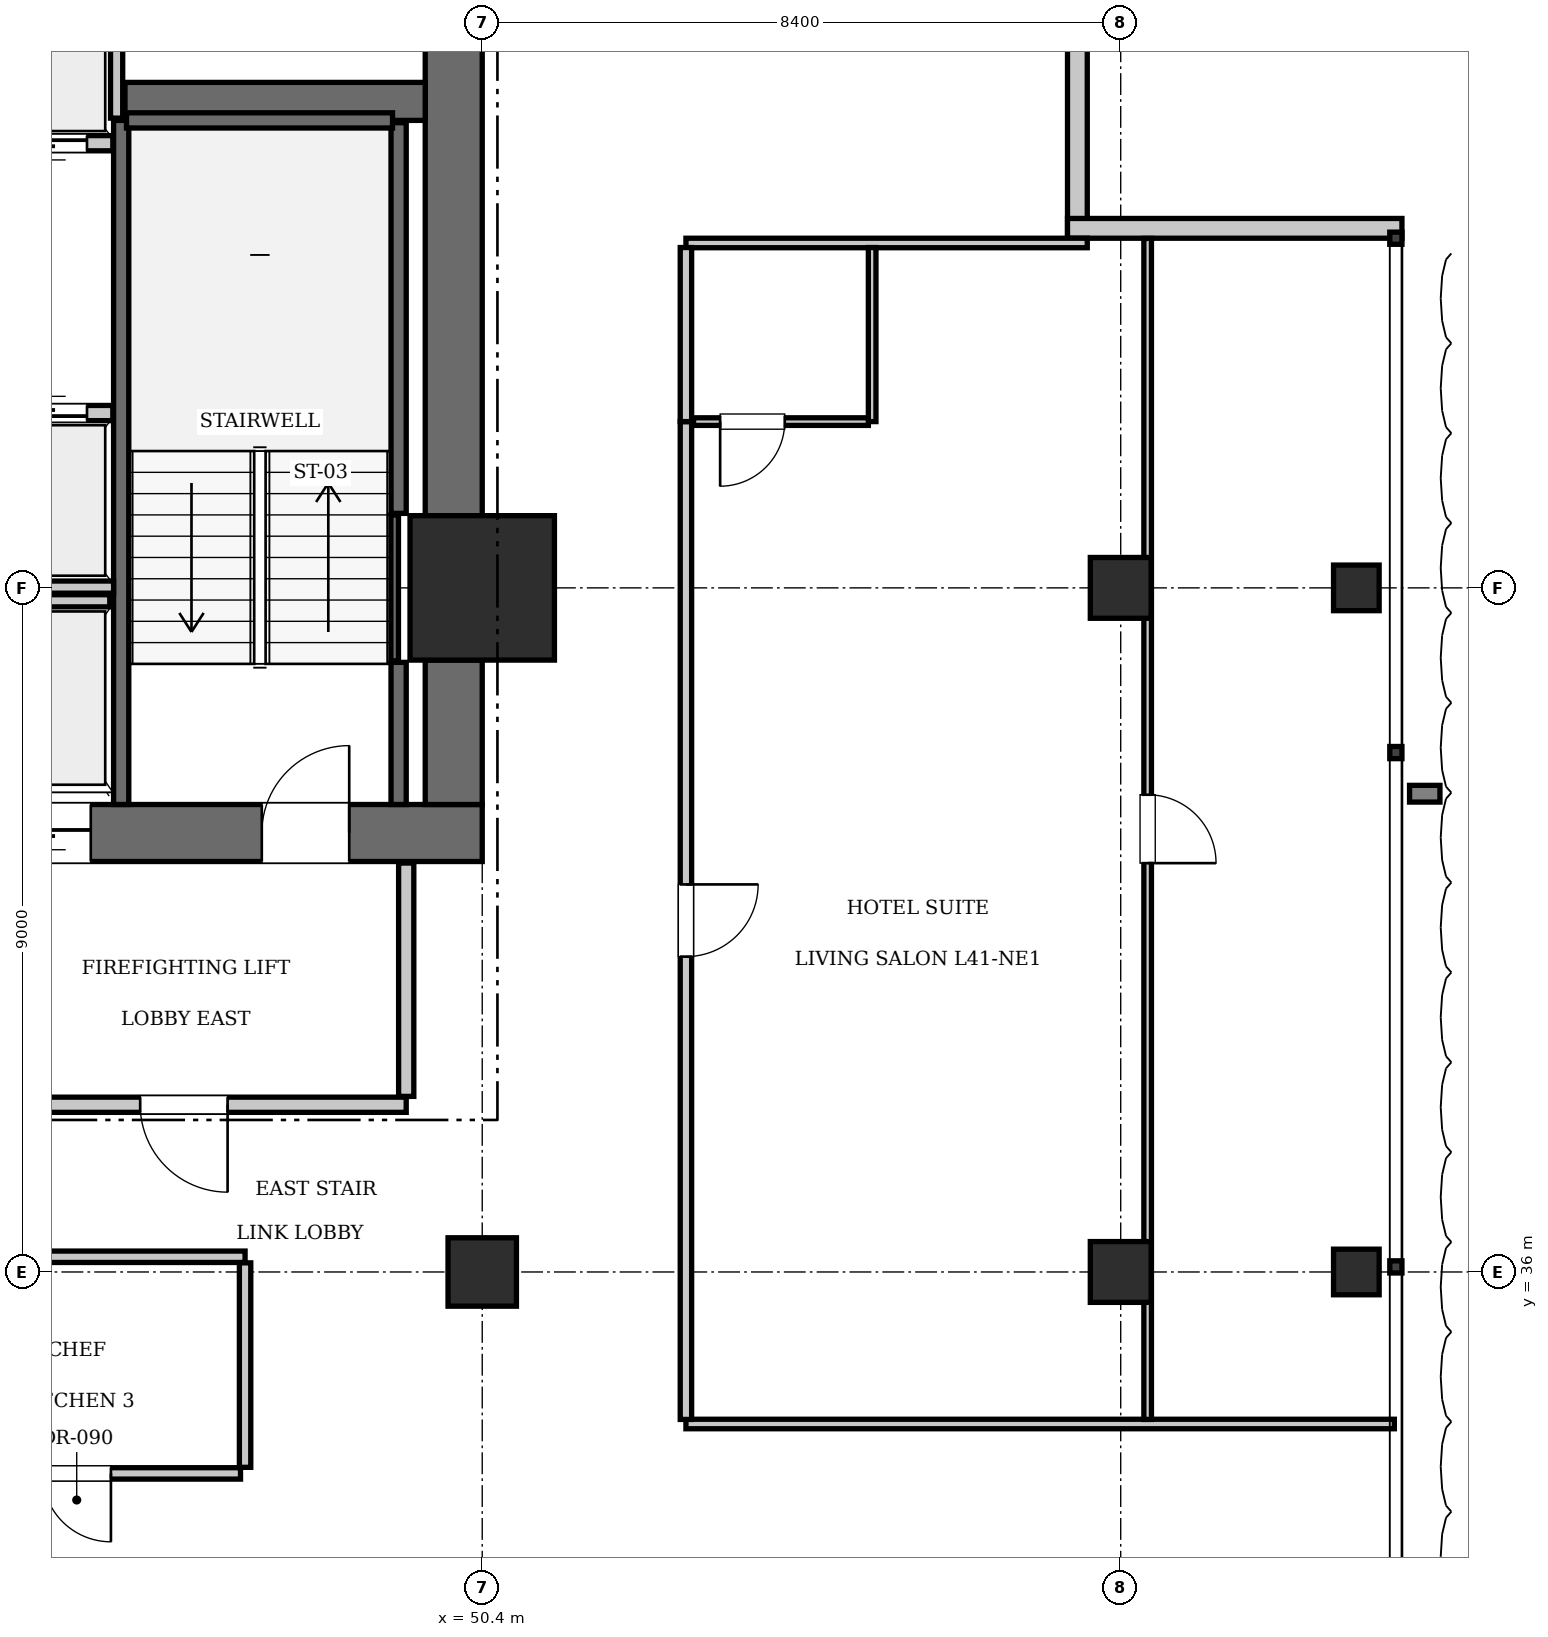
"""IFC4 building model, lengths in metres.
Left out: names, types, materials, properties, quantities, classifications, styles, units other than length and angle.
Written with IfcOpenShell. Run it as: python <this file> out.ifc"""

import sys

from ifc_helpers import new_model, si_unit, direction, frame, frame_2d, origin, origin_2d, place, context, subcontext, project, spatial, rectangle, i_section, extrude, element, fill, save


model = new_model("IFC4")
c1 = context("Model", 3, precision=1e-05, world=origin(), true_north=direction((0.0, 1.0)))
c2 = subcontext(c1, "Body", "Model", "MODEL_VIEW")
j1 = project(units=[si_unit("LENGTHUNIT", "METRE"), si_unit("PLANEANGLEUNIT", "RADIAN")], contexts=[c1])
p1 = place(None, origin())
s1 = spatial("IfcSite", under=j1, at=p1, CompositionType="ELEMENT")
p2 = place(p1, origin())
s2 = spatial("IfcBuilding", under=s1, at=p2, CompositionType="ELEMENT")
p3 = place(p2, frame((0.0, 0.0, 169.75)))
s3 = spatial("IfcBuildingStorey", under=s2, at=p3, CompositionType="ELEMENT", Elevation=169.75)
p4 = place(p3, frame((50.4, 45.0, 0.0), z_axis=(0.0, 0.0, 1.0), x_axis=(1.0, 0.0, 0.0)))
e1 = element("IfcColumn", 1, at=p4, inside=s3, PredefinedType="COLUMN", context=c2, shape_type="SweptSolid", body=[
    extrude(rectangle(XDim=1.9, YDim=1.9, at=origin_2d()), origin(), (0.0, 0.0, 1.0), 3.85),
])
p5 = place(p3, frame((43.6, 41.775, 0.0), z_axis=(0.0, 0.0, 1.0), x_axis=(1.0, 0.0, 0.0)))
e2 = element("IfcWall", 2, at=p5, inside=s3, PredefinedType="SHEAR", context=c2, shape_type="SweptSolid", body=[
    extrude(rectangle(XDim=6.8, YDim=0.75, at=frame_2d((3.4, 0.0))), origin(), (0.0, 0.0, 1.0), 3.85),
])
p6 = place(p5, frame((3.9, 0.0, 0.0)))
e3 = element("IfcOpeningElement", 3, at=p6, cuts=e2, PredefinedType="OPENING", context=c2, shape_type="SweptSolid", body=[
    extrude(rectangle(XDim=1.15, YDim=2.15, at=frame_2d((0.575, 1.075))), frame((0.0, 0.385, 0.0), z_axis=(0.0, -1.0, 0.0), x_axis=(1.0, 0.0, 0.0)), (0.0, 0.0, 1.0), 0.77),
])
p7 = place(p5, frame((0.55, 0.0, 0.0)))
e4 = element("IfcOpeningElement", 4, at=p7, cuts=e2, PredefinedType="OPENING", context=c2, shape_type="SweptSolid", body=[
    extrude(rectangle(XDim=1.1, YDim=2.2, at=frame_2d((0.55, 1.1))), frame((0.0, 0.385, 0.0), z_axis=(0.0, -1.0, 0.0), x_axis=(1.0, 0.0, 0.0)), (0.0, 0.0, 1.0), 0.77),
])
p8 = place(p3, frame((50.025, 42.15, 0.0), z_axis=(0.0, 0.0, 1.0), x_axis=(0.0, 1.0, 0.0)))
e5 = element("IfcWall", 5, at=p8, inside=s3, PredefinedType="SHEAR", context=c2, shape_type="SweptSolid", body=[
    extrude(rectangle(XDim=1.9, YDim=0.75, at=frame_2d((0.95, 0.0))), origin(), (0.0, 0.0, 1.0), 3.85),
])
p9 = place(p3, frame((50.025, 45.95, 0.0), z_axis=(0.0, 0.0, 1.0), x_axis=(0.0, 1.0, 0.0)))
e6 = element("IfcWall", 6, at=p9, inside=s3, PredefinedType="SHEAR", context=c2, shape_type="SweptSolid", body=[
    extrude(rectangle(XDim=7.3, YDim=0.75, at=frame_2d((3.65, 0.0))), origin(), (0.0, 0.0, 1.0), 3.85),
])
p10 = place(p3, frame((45.7, 51.4, 0.0), z_axis=(0.0, 0.0, 1.0), x_axis=(1.0, 0.0, 0.0)))
e7 = element("IfcWall", 7, at=p10, inside=s3, PredefinedType="SHEAR", context=c2, shape_type="SweptSolid", body=[
    extrude(rectangle(XDim=3.95, YDim=0.5, at=frame_2d((1.975, 0.0))), origin(), (0.0, 0.0, 1.0), 3.85),
])
p11 = place(p3, frame((50.4, 36.0, 0.0), z_axis=(0.0, 0.0, 1.0), x_axis=(1.0, 0.0, 0.0)))
e8 = element("IfcColumn", 8, at=p11, inside=s3, PredefinedType="COLUMN", context=c2, shape_type="SweptSolid", body=[
    extrude(rectangle(XDim=0.9, YDim=0.9, at=origin_2d()), origin(), (0.0, 0.0, 1.0), 3.85),
])
for number, where, z_axis, x_axis in (
    (9, (58.8, 36.0, 0.0), (0.0, 0.0, 1.0), (1.0, 0.0, 0.0)),
    (10, (58.8, 45.0, 0.0), (0.0, 0.0, 1.0), (1.0, 0.0, 0.0)),
):
    element("IfcColumn", number, at=place(p3, frame(where, z_axis=z_axis, x_axis=x_axis)), inside=s3, PredefinedType="COLUMN", context=c2, shape_type="SweptSolid", body=[
        extrude(rectangle(XDim=0.8, YDim=0.8, at=origin_2d()), origin(), (0.0, 0.0, 1.0), 3.85),
    ])
for number, where, z_axis, x_axis in (
    (11, (61.9, 36.0, 0.0), (0.0, 0.0, 1.0), (1.0, 0.0, 0.0)),
    (12, (61.9, 45.0, 0.0), (0.0, 0.0, 1.0), (1.0, 0.0, 0.0)),
):
    element("IfcColumn", number, at=place(p3, frame(where, z_axis=z_axis, x_axis=x_axis)), inside=s3, PredefinedType="COLUMN", context=c2, shape_type="SweptSolid", body=[
        extrude(i_section(OverallWidth=0.6, OverallDepth=0.6, WebThickness=0.025, FlangeThickness=0.038, at=origin_2d()), origin(), (0.0, 0.0, 1.0), 3.85),
    ])
p12 = place(p3, frame((45.65, 42.15, 0.0), z_axis=(0.0, 0.0, 1.0), x_axis=(0.0, 1.0, 0.0)))
e13 = element("IfcWall", 13, at=p12, inside=s3, PredefinedType="SOLIDWALL", context=c2, shape_type="SweptSolid", body=[
    extrude(rectangle(XDim=9.0, YDim=0.2, at=frame_2d((4.5, 0.0))), origin(), (0.0, 0.0, 1.0), 3.61),
])
p13 = place(p3, frame((49.3, 42.15, 0.0), z_axis=(0.0, 0.0, 1.0), x_axis=(0.0, 1.0, 0.0)))
e14 = element("IfcWall", 14, at=p13, inside=s3, PredefinedType="SOLIDWALL", context=c2, shape_type="SweptSolid", body=[
    extrude(rectangle(XDim=1.87, YDim=0.2, at=frame_2d((0.935, 0.0))), origin(), (0.0, 0.0, 1.0), 3.61),
])
p14 = place(p3, frame((49.3, 45.98, 0.0), z_axis=(0.0, 0.0, 1.0), x_axis=(0.0, 1.0, 0.0)))
e15 = element("IfcWall", 15, at=p14, inside=s3, PredefinedType="SOLIDWALL", context=c2, shape_type="SweptSolid", body=[
    extrude(rectangle(XDim=5.14, YDim=0.2, at=frame_2d((2.57, 0.0))), origin(), (0.0, 0.0, 1.0), 3.61),
])
p15 = place(p3, frame((45.72, 51.15, 0.0), z_axis=(0.0, 0.0, 1.0), x_axis=(1.0, 0.0, 0.0)))
e16 = element("IfcWall", 16, at=p15, inside=s3, PredefinedType="SOLIDWALL", context=c2, shape_type="SweptSolid", body=[
    extrude(rectangle(XDim=3.5, YDim=0.2, at=frame_2d((1.75, 0.0))), origin(), (0.0, 0.0, 1.0), 3.61),
])
p16 = place(p3, frame((49.248, 44.04, 0.0), z_axis=(0.0, 0.0, 1.0), x_axis=(0.0, 1.0, 0.0)))
e17 = element("IfcWall", 17, at=p16, inside=s3, PredefinedType="SOLIDWALL", context=c2, shape_type="SweptSolid", body=[
    extrude(rectangle(XDim=1.92, YDim=0.1, at=frame_2d((0.96, 0.0))), origin(), (0.0, 0.0, 1.0), 3.61),
])
p17 = place(p3, frame((43.86, 47.3, 0.0), z_axis=(0.0, 0.0, 1.0), x_axis=(1.0, 0.0, 0.0)))
e18 = element("IfcWall", 18, at=p17, inside=s3, PredefinedType="SOLIDWALL", context=c2, shape_type="SweptSolid", body=[
    extrude(rectangle(XDim=1.68, YDim=0.2, at=frame_2d((0.84, 0.0))), origin(), (0.0, 0.0, 1.0), 3.61),
])
p18 = place(p17, frame((0.34, 0.0, 0.0)))
e19 = element("IfcOpeningElement", 19, at=p18, cuts=e18, PredefinedType="OPENING", context=c2, shape_type="SweptSolid", body=[
    extrude(rectangle(XDim=1.0, YDim=2.15, at=frame_2d((0.5, 1.075))), frame((0.0, 0.11, 0.0), z_axis=(0.0, -1.0, 0.0), x_axis=(1.0, 0.0, 0.0)), (0.0, 0.0, 1.0), 0.22),
])
p19 = place(p3, frame((43.86, 50.85, 0.0), z_axis=(0.0, 0.0, 1.0), x_axis=(1.0, 0.0, 0.0)))
e20 = element("IfcWall", 20, at=p19, inside=s3, PredefinedType="SOLIDWALL", context=c2, shape_type="SweptSolid", body=[
    extrude(rectangle(XDim=1.68, YDim=0.2, at=frame_2d((0.84, 0.0))), origin(), (0.0, 0.0, 1.0), 3.61),
])
p20 = place(p19, frame((0.34, 0.0, 0.0)))
e21 = element("IfcOpeningElement", 21, at=p20, cuts=e20, PredefinedType="OPENING", context=c2, shape_type="SweptSolid", body=[
    extrude(rectangle(XDim=1.0, YDim=2.15, at=frame_2d((0.5, 1.075))), frame((0.0, 0.11, 0.0), z_axis=(0.0, -1.0, 0.0), x_axis=(1.0, 0.0, 0.0)), (0.0, 0.0, 1.0), 0.22),
])
p21 = place(p3, frame((43.9, 44.83, 0.0), z_axis=(0.0, 0.0, 1.0), x_axis=(1.0, 0.0, 0.0)))
e22 = element("IfcWall", 22, at=p21, inside=s3, PredefinedType="SOLIDWALL", context=c2, shape_type="SweptSolid", body=[
    extrude(rectangle(XDim=1.6, YDim=0.16, at=frame_2d((0.8, 0.0))), origin(), (0.0, 0.0, 1.0), 3.61),
])
p22 = place(p3, frame((42.1, 45.01, 0.0), z_axis=(0.0, 0.0, 1.0), x_axis=(1.0, 0.0, 0.0)))
e23 = element("IfcWall", 23, at=p22, inside=s3, PredefinedType="SOLIDWALL", context=c2, shape_type="SweptSolid", body=[
    extrude(rectangle(XDim=3.45, YDim=0.16, at=frame_2d((1.725, 0.0))), origin(), (0.0, 0.0, 1.0), 3.61),
])
p23 = place(p3, frame((45.59, 51.18, 0.0), z_axis=(0.0, 0.0, 1.0), x_axis=(0.0, 1.0, 0.0)))
e24 = element("IfcWall", 24, at=p23, inside=s3, PredefinedType="SOLIDWALL", context=c2, shape_type="SweptSolid", body=[
    extrude(rectangle(XDim=2.07, YDim=0.16, at=frame_2d((1.035, 0.0))), origin(), (0.0, 0.0, 1.0), 3.61),
])
for number, where, z_axis, x_axis in (
    (25, (58.23, 54.0, 0.0), (0.0, 0.0, 1.0), (0.0, -1.0, 0.0)),
    (26, (58.1, 49.73, 0.0), (0.0, 0.0, 1.0), (1.0, 0.0, 0.0)),
):
    element("IfcWall", number, at=place(p3, frame(where, z_axis=z_axis, x_axis=x_axis)), inside=s3, PredefinedType="SOLIDWALL", context=c2, shape_type="SweptSolid", body=[
        extrude(rectangle(XDim=4.4, YDim=0.26, at=frame_2d((2.2, 0.0))), origin(), (0.0, 0.0, 1.0), 3.61),
    ])
p24 = place(p3, frame((43.6, 38.2, 0.0), z_axis=(0.0, 0.0, 1.0), x_axis=(1.0, 0.0, 0.0)))
e27 = element("IfcWall", 27, at=p24, inside=s3, PredefinedType="PARTITIONING", context=c2, shape_type="SweptSolid", body=[
    extrude(rectangle(XDim=5.8, YDim=0.2, at=frame_2d((2.9, 0.0))), origin(), (0.0, 0.0, 1.0), 3.61),
])
p25 = place(p24, frame((2.3, 0.0, 0.0)))
e28 = element("IfcOpeningElement", 28, at=p25, cuts=e27, PredefinedType="OPENING", context=c2, shape_type="SweptSolid", body=[
    extrude(rectangle(XDim=1.15, YDim=2.15, at=frame_2d((0.575, 1.075))), frame((0.0, 0.11, 0.0), z_axis=(0.0, -1.0, 0.0), x_axis=(1.0, 0.0, 0.0)), (0.0, 0.0, 1.0), 0.22),
])
p26 = place(p3, frame((49.4, 38.31, 0.0), z_axis=(0.0, 0.0, 1.0), x_axis=(0.0, 1.0, 0.0)))
e29 = element("IfcWall", 29, at=p26, inside=s3, PredefinedType="PARTITIONING", context=c2, shape_type="SweptSolid", body=[
    extrude(rectangle(XDim=3.07, YDim=0.2, at=frame_2d((1.535, 0.0))), origin(), (0.0, 0.0, 1.0), 3.61),
])
p27 = place(p3, frame((42.85, 36.2, 0.0), z_axis=(0.0, 0.0, 1.0), x_axis=(1.0, 0.0, 0.0)))
e30 = element("IfcWall", 30, at=p27, inside=s3, PredefinedType="PARTITIONING", context=c2, shape_type="SweptSolid", body=[
    extrude(rectangle(XDim=4.43, YDim=0.15, at=frame_2d((2.215, 0.0))), origin(), (0.0, 0.0, 1.0), 3.61),
])
p28 = place(p3, frame((47.28, 33.43, 0.0), z_axis=(0.0, 0.0, 1.0), x_axis=(0.0, 1.0, 0.0)))
e31 = element("IfcWall", 31, at=p28, inside=s3, PredefinedType="PARTITIONING", context=c2, shape_type="SweptSolid", body=[
    extrude(rectangle(XDim=2.69, YDim=0.15, at=frame_2d((1.345, 0.0))), origin(), (0.0, 0.0, 1.0), 3.61),
])
p29 = place(p3, frame((42.91, 33.35, 0.0), z_axis=(0.0, 0.0, 1.0), x_axis=(1.0, 0.0, 0.0)))
e32 = element("IfcWall", 32, at=p29, inside=s3, PredefinedType="PARTITIONING", context=c2, shape_type="SweptSolid", body=[
    extrude(rectangle(XDim=4.31, YDim=0.15, at=frame_2d((2.155, 0.0))), origin(), (0.0, 0.0, 1.0), 3.61),
])
p30 = place(p29, frame((1.705, 0.0, 0.0)))
e33 = element("IfcOpeningElement", 33, at=p30, cuts=e32, PredefinedType="OPENING", context=c2, shape_type="SweptSolid", body=[
    extrude(rectangle(XDim=0.9, YDim=2.1, at=frame_2d((0.45, 1.05))), frame((0.0, 0.085, 0.0), z_axis=(0.0, -1.0, 0.0), x_axis=(1.0, 0.0, 0.0)), (0.0, 0.0, 1.0), 0.17),
])
p31 = place(p3, frame((53.08, 34.0, 0.0), z_axis=(0.0, 0.0, 1.0), x_axis=(1.0, 0.0, 0.0)))
e34 = element("IfcWall", 34, at=p31, inside=s3, PredefinedType="PARTITIONING", context=c2, shape_type="SweptSolid", body=[
    extrude(rectangle(XDim=9.32, YDim=0.125, at=frame_2d((4.66, 0.0))), origin(), (0.0, 0.0, 1.0), 3.61),
])
p32 = place(p3, frame((53.08, 49.538, 0.0), z_axis=(0.0, 0.0, 1.0), x_axis=(1.0, 0.0, 0.0)))
e35 = element("IfcWall", 35, at=p32, inside=s3, PredefinedType="PARTITIONING", context=c2, shape_type="SweptSolid", body=[
    extrude(rectangle(XDim=5.28, YDim=0.125, at=frame_2d((2.64, 0.0))), origin(), (0.0, 0.0, 1.0), 3.61),
])
p33 = place(p3, frame((53.08, 34.06, 0.0), z_axis=(0.0, 0.0, 1.0), x_axis=(0.0, 1.0, 0.0)))
e36 = element("IfcWall", 36, at=p33, inside=s3, PredefinedType="PARTITIONING", context=c2, shape_type="SweptSolid", body=[
    extrude(rectangle(XDim=13.127, YDim=0.15, at=frame_2d((6.564, 0.0))), origin(), (0.0, 0.0, 1.0), 3.61),
])
p34 = place(p33, frame((6.089, 0.0, 0.0)))
e37 = element("IfcOpeningElement", 37, at=p34, cuts=e36, PredefinedType="OPENING", context=c2, shape_type="SweptSolid", body=[
    extrude(rectangle(XDim=0.95, YDim=2.15, at=frame_2d((0.475, 1.075))), frame((0.0, 0.085, 0.0), z_axis=(0.0, -1.0, 0.0), x_axis=(1.0, 0.0, 0.0)), (0.0, 0.0, 1.0), 0.17),
])
p35 = place(p3, frame((53.08, 47.188, 0.0), z_axis=(0.0, 0.0, 1.0), x_axis=(0.0, 1.0, 0.0)))
e38 = element("IfcWall", 38, at=p35, inside=s3, PredefinedType="PARTITIONING", context=c2, shape_type="SweptSolid", body=[
    extrude(rectangle(XDim=2.29, YDim=0.15, at=frame_2d((1.145, 0.0))), origin(), (0.0, 0.0, 1.0), 3.61),
])
p36 = place(p3, frame((55.53, 47.188, 0.0), z_axis=(0.0, 0.0, 1.0), x_axis=(0.0, 1.0, 0.0)))
e39 = element("IfcWall", 39, at=p36, inside=s3, PredefinedType="PARTITIONING", context=c2, shape_type="SweptSolid", body=[
    extrude(rectangle(XDim=2.29, YDim=0.1, at=frame_2d((1.145, 0.0))), origin(), (0.0, 0.0, 1.0), 3.61),
])
p37 = place(p3, frame((53.18, 47.188, 0.0), z_axis=(0.0, 0.0, 1.0), x_axis=(1.0, 0.0, 0.0)))
e40 = element("IfcWall", 40, at=p37, inside=s3, PredefinedType="PARTITIONING", context=c2, shape_type="SweptSolid", body=[
    extrude(rectangle(XDim=2.3, YDim=0.1, at=frame_2d((1.15, 0.0))), origin(), (0.0, 0.0, 1.0), 3.61),
])
p38 = place(p37, frame((0.35, 0.0, 0.0)))
e41 = element("IfcOpeningElement", 41, at=p38, cuts=e40, PredefinedType="OPENING", context=c2, shape_type="SweptSolid", body=[
    extrude(rectangle(XDim=0.85, YDim=2.1, at=frame_2d((0.425, 1.05))), frame((0.0, 0.06, 0.0), z_axis=(0.0, -1.0, 0.0), x_axis=(1.0, 0.0, 0.0)), (0.0, 0.0, 1.0), 0.12),
])
p39 = place(p3, frame((59.154, 34.06, 0.0), z_axis=(0.0, 0.0, 1.0), x_axis=(0.0, 1.0, 0.0)))
e42 = element("IfcWall", 42, at=p39, inside=s3, PredefinedType="PARTITIONING", context=c2, shape_type="SweptSolid", body=[
    extrude(rectangle(XDim=15.537, YDim=0.1, at=frame_2d((7.769, 0.0))), origin(), (0.0, 0.0, 1.0), 3.61),
])
p40 = place(p39, frame((7.319, 0.0, 0.0)))
e43 = element("IfcOpeningElement", 43, at=p40, cuts=e42, PredefinedType="OPENING", context=c2, shape_type="SweptSolid", body=[
    extrude(rectangle(XDim=0.9, YDim=2.1, at=frame_2d((0.45, 1.05))), frame((0.0, 0.06, 0.0), z_axis=(0.0, -1.0, 0.0), x_axis=(1.0, 0.0, 0.0)), (0.0, 0.0, 1.0), 0.12),
])
p41 = place(p6, origin())
e44 = element("IfcDoor", 44, at=p41, inside=s3, OperationType="SINGLE_SWING_RIGHT", PredefinedType="DOOR", context=c2, shape_type="SweptSolid", body=[
    extrude(rectangle(XDim=1.15, YDim=2.15, at=frame_2d((0.575, 1.075))), frame((0.0, 0.025, 0.0), z_axis=(0.0, -1.0, 0.0), x_axis=(1.0, 0.0, 0.0)), (0.0, 0.0, 1.0), 0.05),
])
fill(e3, e44)
p42 = place(p18, origin())
e45 = element("IfcDoor", 45, at=p42, inside=s3, OperationType="SLIDING_TO_LEFT", PredefinedType="DOOR", context=c2, shape_type="SweptSolid", body=[
    extrude(rectangle(XDim=1.0, YDim=2.15, at=frame_2d((0.5, 1.075))), frame((0.0, 0.025, 0.0), z_axis=(0.0, -1.0, 0.0), x_axis=(1.0, 0.0, 0.0)), (0.0, 0.0, 1.0), 0.05),
])
fill(e19, e45)
p43 = place(p20, frame((1.0, 0.0, 0.0), z_axis=(0.0, 0.0, 1.0), x_axis=(-1.0, 0.0, 0.0)))
e46 = element("IfcDoor", 46, at=p43, inside=s3, OperationType="SLIDING_TO_LEFT", PredefinedType="DOOR", context=c2, shape_type="SweptSolid", body=[
    extrude(rectangle(XDim=1.0, YDim=2.15, at=frame_2d((0.5, 1.075))), frame((0.0, 0.025, 0.0), z_axis=(0.0, -1.0, 0.0), x_axis=(1.0, 0.0, 0.0)), (0.0, 0.0, 1.0), 0.05),
])
fill(e21, e46)
p44 = place(p7, frame((1.1, 0.0, 0.0), z_axis=(0.0, 0.0, 1.0), x_axis=(-1.0, 0.0, 0.0)))
e47 = element("IfcDoor", 47, at=p44, inside=s3, OperationType="SLIDING_TO_LEFT", PredefinedType="DOOR", context=c2, shape_type="SweptSolid", body=[
    extrude(rectangle(XDim=1.1, YDim=2.2, at=frame_2d((0.55, 1.1))), frame((0.0, 0.025, 0.0), z_axis=(0.0, -1.0, 0.0), x_axis=(1.0, 0.0, 0.0)), (0.0, 0.0, 1.0), 0.05),
])
fill(e4, e47)
p45 = place(p25, frame((1.15, 0.0, 0.0), z_axis=(0.0, 0.0, 1.0), x_axis=(-1.0, 0.0, 0.0)))
e48 = element("IfcDoor", 48, at=p45, inside=s3, OperationType="SINGLE_SWING_LEFT", PredefinedType="DOOR", context=c2, shape_type="SweptSolid", body=[
    extrude(rectangle(XDim=1.15, YDim=2.15, at=frame_2d((0.575, 1.075))), frame((0.0, 0.025, 0.0), z_axis=(0.0, -1.0, 0.0), x_axis=(1.0, 0.0, 0.0)), (0.0, 0.0, 1.0), 0.05),
])
fill(e28, e48)
p46 = place(p30, frame((0.9, 0.0, 0.0), z_axis=(0.0, 0.0, 1.0), x_axis=(-1.0, 0.0, 0.0)))
e49 = element("IfcDoor", 49, at=p46, inside=s3, OperationType="SINGLE_SWING_LEFT", PredefinedType="DOOR", context=c2, shape_type="SweptSolid", body=[
    extrude(rectangle(XDim=0.9, YDim=2.1, at=frame_2d((0.45, 1.05))), frame((0.0, 0.025, 0.0), z_axis=(0.0, -1.0, 0.0), x_axis=(1.0, 0.0, 0.0)), (0.0, 0.0, 1.0), 0.05),
])
fill(e33, e49)
p47 = place(p38, frame((0.85, 0.0, 0.0), z_axis=(0.0, 0.0, 1.0), x_axis=(-1.0, 0.0, 0.0)))
e50 = element("IfcDoor", 50, at=p47, inside=s3, OperationType="SINGLE_SWING_RIGHT", PredefinedType="DOOR", context=c2, shape_type="SweptSolid", body=[
    extrude(rectangle(XDim=0.85, YDim=2.1, at=frame_2d((0.425, 1.05))), frame((0.0, 0.025, 0.0), z_axis=(0.0, -1.0, 0.0), x_axis=(1.0, 0.0, 0.0)), (0.0, 0.0, 1.0), 0.05),
])
fill(e41, e50)
p48 = place(p34, frame((0.95, 0.0, 0.0), z_axis=(0.0, 0.0, 1.0), x_axis=(-1.0, 0.0, 0.0)))
e51 = element("IfcDoor", 51, at=p48, inside=s3, OperationType="SINGLE_SWING_LEFT", PredefinedType="DOOR", context=c2, shape_type="SweptSolid", body=[
    extrude(rectangle(XDim=0.95, YDim=2.15, at=frame_2d((0.475, 1.075))), frame((0.0, 0.025, 0.0), z_axis=(0.0, -1.0, 0.0), x_axis=(1.0, 0.0, 0.0)), (0.0, 0.0, 1.0), 0.05),
])
fill(e37, e51)
p49 = place(p40, frame((0.9, 0.0, 0.0), z_axis=(0.0, 0.0, 1.0), x_axis=(-1.0, 0.0, 0.0)))
e52 = element("IfcDoor", 52, at=p49, inside=s3, OperationType="SINGLE_SWING_RIGHT", PredefinedType="DOOR", context=c2, shape_type="SweptSolid", body=[
    extrude(rectangle(XDim=0.9, YDim=2.1, at=frame_2d((0.45, 1.05))), frame((0.0, 0.025, 0.0), z_axis=(0.0, -1.0, 0.0), x_axis=(1.0, 0.0, 0.0)), (0.0, 0.0, 1.0), 0.05),
])
fill(e43, e52)
save(model, sys.argv[1])
